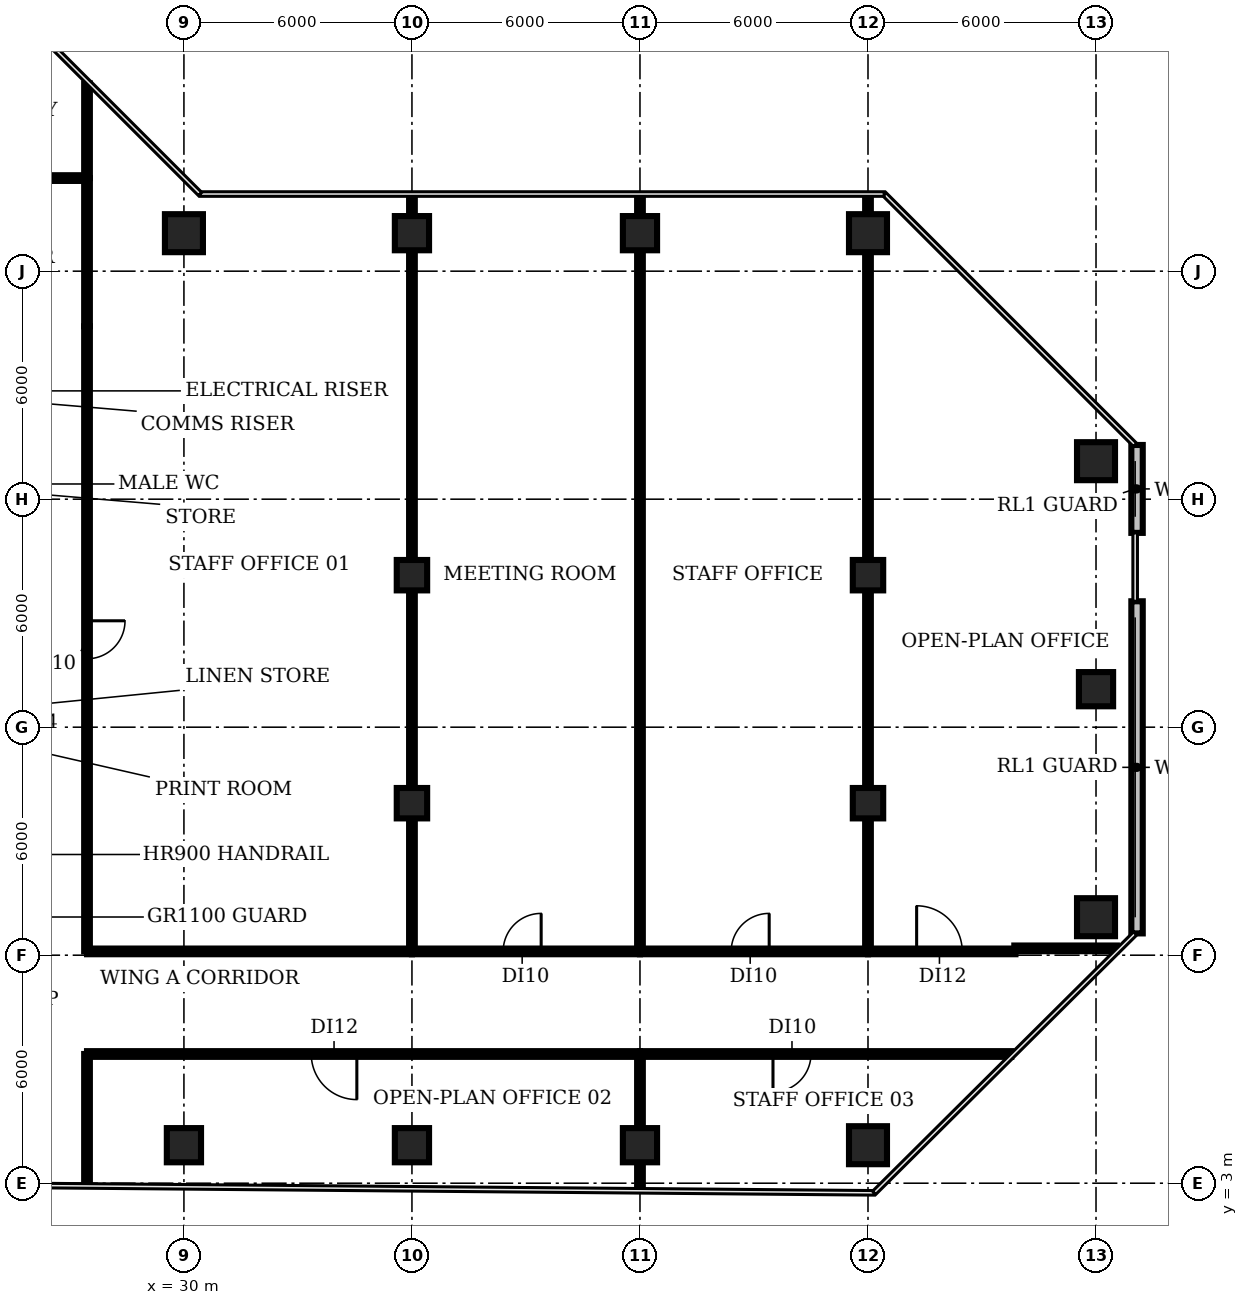
"""IFC4 building model, lengths in metres.
Left out: names, types, materials, properties, quantities, classifications, styles, units other than length and angle.
Written with IfcOpenShell. Run it as: python <this file> out.ifc"""

import sys

from ifc_helpers import new_model, si_unit, direction, frame, frame_2d, origin, origin_2d, place, context, subcontext, project, spatial, rectangle, circle, extrude, element, fill, save


model = new_model("IFC4")
c1 = context("Model", 3, precision=1e-05, world=origin(), true_north=direction((0.0, 1.0)))
c2 = subcontext(c1, "Body", "Model", "MODEL_VIEW")
j1 = project(units=[si_unit("LENGTHUNIT", "METRE"), si_unit("PLANEANGLEUNIT", "RADIAN")], contexts=[c1])
p1 = place(None, origin())
s1 = spatial("IfcSite", under=j1, at=p1, CompositionType="ELEMENT")
p2 = place(p1, origin())
s2 = spatial("IfcBuilding", under=s1, at=p2, CompositionType="ELEMENT")
p3 = place(p2, frame((0.0, 0.0, 113.0)))
s3 = spatial("IfcBuildingStorey", under=s2, at=p3, CompositionType="ELEMENT", Elevation=113.0)
p4 = place(p3, frame((30.0, 4.0, 0.0), z_axis=(0.0, 0.0, 1.0), x_axis=(1.0, 0.0, 0.0)))
e1 = element("IfcColumn", 1, at=p4, inside=s3, PredefinedType="COLUMN", context=c2, shape_type="SweptSolid", body=[
    extrude(rectangle(XDim=0.9, YDim=0.9, at=origin_2d()), origin(), (0.0, 0.0, 1.0), 3.85),
])
p5 = place(p3, frame((30.0, 28.0, 0.0), z_axis=(0.0, 0.0, 1.0), x_axis=(1.0, 0.0, 0.0)))
e2 = element("IfcColumn", 2, at=p5, inside=s3, PredefinedType="COLUMN", context=c2, shape_type="SweptSolid", body=[
    extrude(circle(Radius=0.5, at=origin_2d()), origin(), (0.0, 0.0, 1.0), 3.85),
])
p6 = place(p3, frame((36.0, 4.0, 0.0), z_axis=(0.0, 0.0, 1.0), x_axis=(1.0, 0.0, 0.0)))
e3 = element("IfcColumn", 3, at=p6, inside=s3, PredefinedType="COLUMN", context=c2, shape_type="SweptSolid", body=[
    extrude(rectangle(XDim=0.9, YDim=0.9, at=origin_2d()), origin(), (0.0, 0.0, 1.0), 3.85),
])
for number, where, z_axis, x_axis in (
    (4, (36.0, 13.0, 0.0), (0.0, 0.0, 1.0), (1.0, 0.0, 0.0)),
    (5, (36.0, 19.0, 0.0), (0.0, 0.0, 1.0), (1.0, 0.0, 0.0)),
):
    element("IfcColumn", number, at=place(p3, frame(where, z_axis=z_axis, x_axis=x_axis)), inside=s3, PredefinedType="COLUMN", context=c2, shape_type="SweptSolid", body=[
        extrude(rectangle(XDim=0.8, YDim=0.8, at=origin_2d()), origin(), (0.0, 0.0, 1.0), 3.85),
    ])
for number, where, z_axis, x_axis in (
    (6, (36.0, 28.0, 0.0), (0.0, 0.0, 1.0), (1.0, 0.0, 0.0)),
    (7, (42.0, 4.0, 0.0), (0.0, 0.0, 1.0), (1.0, 0.0, 0.0)),
    (8, (42.0, 28.0, 0.0), (0.0, 0.0, 1.0), (1.0, 0.0, 0.0)),
):
    element("IfcColumn", number, at=place(p3, frame(where, z_axis=z_axis, x_axis=x_axis)), inside=s3, PredefinedType="COLUMN", context=c2, shape_type="SweptSolid", body=[
        extrude(rectangle(XDim=0.9, YDim=0.9, at=origin_2d()), origin(), (0.0, 0.0, 1.0), 3.85),
    ])
p7 = place(p3, frame((48.0, 4.0, 0.0), z_axis=(0.0, 0.0, 1.0), x_axis=(1.0, 0.0, 0.0)))
e9 = element("IfcColumn", 9, at=p7, inside=s3, PredefinedType="COLUMN", context=c2, shape_type="SweptSolid", body=[
    extrude(circle(Radius=0.5, at=origin_2d()), origin(), (0.0, 0.0, 1.0), 3.85),
])
for number, where, z_axis, x_axis in (
    (10, (48.0, 13.0, 0.0), (0.0, 0.0, 1.0), (1.0, 0.0, 0.0)),
    (11, (48.0, 19.0, 0.0), (0.0, 0.0, 1.0), (1.0, 0.0, 0.0)),
):
    element("IfcColumn", number, at=place(p3, frame(where, z_axis=z_axis, x_axis=x_axis)), inside=s3, PredefinedType="COLUMN", context=c2, shape_type="SweptSolid", body=[
        extrude(rectangle(XDim=0.8, YDim=0.8, at=origin_2d()), origin(), (0.0, 0.0, 1.0), 3.85),
    ])
for number, where, z_axis, x_axis in (
    (12, (48.0, 28.0, 0.0), (0.0, 0.0, 1.0), (1.0, 0.0, 0.0)),
    (13, (54.0, 10.0, 0.0), (0.0, 0.0, 1.0), (1.0, 0.0, 0.0)),
):
    element("IfcColumn", number, at=place(p3, frame(where, z_axis=z_axis, x_axis=x_axis)), inside=s3, PredefinedType="COLUMN", context=c2, shape_type="SweptSolid", body=[
        extrude(circle(Radius=0.5, at=origin_2d()), origin(), (0.0, 0.0, 1.0), 3.85),
    ])
p8 = place(p3, frame((54.0, 16.0, 0.0), z_axis=(0.0, 0.0, 1.0), x_axis=(1.0, 0.0, 0.0)))
e14 = element("IfcColumn", 14, at=p8, inside=s3, PredefinedType="COLUMN", context=c2, shape_type="SweptSolid", body=[
    extrude(rectangle(XDim=0.9, YDim=0.9, at=origin_2d()), origin(), (0.0, 0.0, 1.0), 3.85),
])
p9 = place(p3, frame((54.0, 22.0, 0.0), z_axis=(0.0, 0.0, 1.0), x_axis=(1.0, 0.0, 0.0)))
e15 = element("IfcColumn", 15, at=p9, inside=s3, PredefinedType="COLUMN", context=c2, shape_type="SweptSolid", body=[
    extrude(circle(Radius=0.5, at=origin_2d()), origin(), (0.0, 0.0, 1.0), 3.85),
])
p10 = place(p3, frame((55.08, 9.573, 0.0), z_axis=(0.0, 0.0, 1.0), x_axis=(0.0, 1.0, 0.0)))
e16 = element("IfcWall", 16, at=p10, inside=s3, PredefinedType="SOLIDWALL", context=c2, shape_type="SweptSolid", body=[
    extrude(rectangle(XDim=8.74, YDim=0.3, at=frame_2d((4.37, 0.0))), origin(), (0.0, 0.0, 1.0), 3.85),
])
p11 = place(p3, frame((55.08, 20.113, 0.0), z_axis=(0.0, 0.0, 1.0), x_axis=(0.0, 1.0, 0.0)))
e17 = element("IfcWall", 17, at=p11, inside=s3, PredefinedType="SOLIDWALL", context=c2, shape_type="SweptSolid", body=[
    extrude(rectangle(XDim=2.313, YDim=0.3, at=frame_2d((1.157, 0.0))), origin(), (0.0, 0.0, 1.0), 3.85),
])
p12 = place(p3, frame((23.85, 29.45, 0.0), z_axis=(0.0, 0.0, 1.0), x_axis=(1.0, 0.0, 0.0)))
e18 = element("IfcWall", 18, at=p12, inside=s3, PredefinedType="PARTITIONING", context=c2, shape_type="SweptSolid", body=[
    extrude(rectangle(XDim=3.6, YDim=0.15, at=frame_2d((1.8, 0.0))), origin(), (0.0, 0.0, 1.0), 2.83),
])
p13 = place(p12, frame((1.3, 0.0, 0.0)))
e19 = element("IfcOpeningElement", 19, at=p13, cuts=e18, PredefinedType="OPENING", context=c2, shape_type="SweptSolid", body=[
    extrude(rectangle(XDim=0.9, YDim=2.1, at=frame_2d((0.45, 1.05))), frame((0.0, 0.085, 0.0), z_axis=(0.0, -1.0, 0.0), x_axis=(1.0, 0.0, 0.0)), (0.0, 0.0, 1.0), 0.17),
])
p14 = place(p3, frame((27.45, 2.98, 0.0), z_axis=(0.0, 0.0, 1.0), x_axis=(0.0, 1.0, 0.0)))
e20 = element("IfcWall", 20, at=p14, inside=s3, PredefinedType="PARTITIONING", context=c2, shape_type="SweptSolid", body=[
    extrude(rectangle(XDim=3.42, YDim=0.15, at=frame_2d((1.71, 0.0))), origin(), (0.0, 0.0, 1.0), 2.83),
])
p15 = place(p3, frame((27.45, 9.1, 0.0), z_axis=(0.0, 0.0, 1.0), x_axis=(1.0, 0.0, 0.0)))
e21 = element("IfcWall", 21, at=p15, inside=s3, PredefinedType="PARTITIONING", context=c2, shape_type="SweptSolid", body=[
    extrude(rectangle(XDim=8.55, YDim=0.15, at=frame_2d((4.275, 0.0))), origin(), (0.0, 0.0, 1.0), 2.83),
])
p16 = place(p3, frame((27.45, 25.55, 0.0), z_axis=(0.0, 0.0, 1.0), x_axis=(0.0, -1.0, 0.0)))
e22 = element("IfcWall", 22, at=p16, inside=s3, PredefinedType="PARTITIONING", context=c2, shape_type="SweptSolid", body=[
    extrude(rectangle(XDim=16.45, YDim=0.15, at=frame_2d((8.225, 0.0))), origin(), (0.0, 0.0, 1.0), 2.83),
])
p17 = place(p16, frame((7.75, 0.0, 0.0)))
e23 = element("IfcOpeningElement", 23, at=p17, cuts=e22, PredefinedType="OPENING", context=c2, shape_type="SweptSolid", body=[
    extrude(rectangle(XDim=1.0, YDim=2.1, at=frame_2d((0.5, 1.05))), frame((0.0, 0.085, 0.0), z_axis=(0.0, -1.0, 0.0), x_axis=(1.0, 0.0, 0.0)), (0.0, 0.0, 1.0), 0.17),
])
p18 = place(p3, frame((27.45, 25.55, 0.0), z_axis=(0.0, 0.0, 1.0), x_axis=(0.0, 1.0, 0.0)))
e24 = element("IfcWall", 24, at=p18, inside=s3, PredefinedType="PARTITIONING", context=c2, shape_type="SweptSolid", body=[
    extrude(rectangle(XDim=3.9, YDim=0.15, at=frame_2d((1.95, 0.0))), origin(), (0.0, 0.0, 1.0), 2.83),
])
p19 = place(p3, frame((27.45, 29.45, 0.0), z_axis=(0.0, 0.0, 1.0), x_axis=(0.0, 1.0, 0.0)))
e25 = element("IfcWall", 25, at=p19, inside=s3, PredefinedType="PARTITIONING", context=c2, shape_type="SweptSolid", body=[
    extrude(rectangle(XDim=2.49, YDim=0.15, at=frame_2d((1.245, 0.0))), origin(), (0.0, 0.0, 1.0), 2.83),
])
p20 = place(p3, frame((36.0, 9.1, 0.0), z_axis=(0.0, 0.0, 1.0), x_axis=(0.0, 1.0, 0.0)))
e26 = element("IfcWall", 26, at=p20, inside=s3, PredefinedType="PARTITIONING", context=c2, shape_type="SweptSolid", body=[
    extrude(rectangle(XDim=19.88, YDim=0.15, at=frame_2d((9.94, 0.0))), origin(), (0.0, 0.0, 1.0), 2.83),
])
p21 = place(p3, frame((36.0, 9.1, 0.0), z_axis=(0.0, 0.0, 1.0), x_axis=(1.0, 0.0, 0.0)))
e27 = element("IfcWall", 27, at=p21, inside=s3, PredefinedType="PARTITIONING", context=c2, shape_type="SweptSolid", body=[
    extrude(rectangle(XDim=6.0, YDim=0.15, at=frame_2d((3.0, 0.0))), origin(), (0.0, 0.0, 1.0), 2.83),
])
p22 = place(p21, frame((2.4, 0.0, 0.0)))
e28 = element("IfcOpeningElement", 28, at=p22, cuts=e27, PredefinedType="OPENING", context=c2, shape_type="SweptSolid", body=[
    extrude(rectangle(XDim=1.0, YDim=2.1, at=frame_2d((0.5, 1.05))), frame((0.0, 0.085, 0.0), z_axis=(0.0, -1.0, 0.0), x_axis=(1.0, 0.0, 0.0)), (0.0, 0.0, 1.0), 0.17),
])
p23 = place(p3, frame((42.0, 2.85, 0.0), z_axis=(0.0, 0.0, 1.0), x_axis=(0.0, 1.0, 0.0)))
e29 = element("IfcWall", 29, at=p23, inside=s3, PredefinedType="PARTITIONING", context=c2, shape_type="SweptSolid", body=[
    extrude(rectangle(XDim=3.55, YDim=0.15, at=frame_2d((1.775, 0.0))), origin(), (0.0, 0.0, 1.0), 2.83),
])
p24 = place(p3, frame((42.0, 6.4, 0.0), z_axis=(0.0, 0.0, 1.0), x_axis=(-1.0, 0.0, 0.0)))
e30 = element("IfcWall", 30, at=p24, inside=s3, PredefinedType="PARTITIONING", context=c2, shape_type="SweptSolid", body=[
    extrude(rectangle(XDim=14.55, YDim=0.15, at=frame_2d((7.275, 0.0))), origin(), (0.0, 0.0, 1.0), 2.83),
])
p25 = place(p24, frame((7.45, 0.0, 0.0)))
e31 = element("IfcOpeningElement", 31, at=p25, cuts=e30, PredefinedType="OPENING", context=c2, shape_type="SweptSolid", body=[
    extrude(rectangle(XDim=1.2, YDim=2.1, at=frame_2d((0.6, 1.05))), frame((0.0, 0.085, 0.0), z_axis=(0.0, -1.0, 0.0), x_axis=(1.0, 0.0, 0.0)), (0.0, 0.0, 1.0), 0.17),
])
p26 = place(p3, frame((42.0, 9.1, 0.0), z_axis=(0.0, 0.0, 1.0), x_axis=(0.0, 1.0, 0.0)))
e32 = element("IfcWall", 32, at=p26, inside=s3, PredefinedType="PARTITIONING", context=c2, shape_type="SweptSolid", body=[
    extrude(rectangle(XDim=19.88, YDim=0.15, at=frame_2d((9.94, 0.0))), origin(), (0.0, 0.0, 1.0), 2.83),
])
p27 = place(p3, frame((42.0, 9.1, 0.0), z_axis=(0.0, 0.0, 1.0), x_axis=(1.0, 0.0, 0.0)))
e33 = element("IfcWall", 33, at=p27, inside=s3, PredefinedType="PARTITIONING", context=c2, shape_type="SweptSolid", body=[
    extrude(rectangle(XDim=6.0, YDim=0.15, at=frame_2d((3.0, 0.0))), origin(), (0.0, 0.0, 1.0), 2.83),
])
p28 = place(p27, frame((2.4, 0.0, 0.0)))
e34 = element("IfcOpeningElement", 34, at=p28, cuts=e33, PredefinedType="OPENING", context=c2, shape_type="SweptSolid", body=[
    extrude(rectangle(XDim=1.0, YDim=2.1, at=frame_2d((0.5, 1.05))), frame((0.0, 0.085, 0.0), z_axis=(0.0, -1.0, 0.0), x_axis=(1.0, 0.0, 0.0)), (0.0, 0.0, 1.0), 0.17),
])
p29 = place(p3, frame((48.0, 9.1, 0.0), z_axis=(0.0, 0.0, 1.0), x_axis=(0.0, 1.0, 0.0)))
e35 = element("IfcWall", 35, at=p29, inside=s3, PredefinedType="PARTITIONING", context=c2, shape_type="SweptSolid", body=[
    extrude(rectangle(XDim=19.88, YDim=0.15, at=frame_2d((9.94, 0.0))), origin(), (0.0, 0.0, 1.0), 2.83),
])
p30 = place(p3, frame((48.0, 9.1, 0.0), z_axis=(0.0, 0.0, 1.0), x_axis=(1.0, 0.0, 0.0)))
e36 = element("IfcWall", 36, at=p30, inside=s3, PredefinedType="PARTITIONING", context=c2, shape_type="SweptSolid", body=[
    extrude(rectangle(XDim=3.88, YDim=0.15, at=frame_2d((1.94, 0.0))), origin(), (0.0, 0.0, 1.0), 2.83),
])
p31 = place(p30, frame((1.28, 0.0, 0.0)))
e37 = element("IfcOpeningElement", 37, at=p31, cuts=e36, PredefinedType="OPENING", context=c2, shape_type="SweptSolid", body=[
    extrude(rectangle(XDim=1.2, YDim=2.1, at=frame_2d((0.6, 1.05))), frame((0.0, 0.085, 0.0), z_axis=(0.0, -1.0, 0.0), x_axis=(1.0, 0.0, 0.0)), (0.0, 0.0, 1.0), 0.17),
])
p32 = place(p3, frame((51.77, 6.4, 0.0), z_axis=(0.0, 0.0, 1.0), x_axis=(-1.0, 0.0, 0.0)))
e38 = element("IfcWall", 38, at=p32, inside=s3, PredefinedType="PARTITIONING", context=c2, shape_type="SweptSolid", body=[
    extrude(rectangle(XDim=9.77, YDim=0.15, at=frame_2d((4.885, 0.0))), origin(), (0.0, 0.0, 1.0), 2.83),
])
p33 = place(p32, frame((5.27, 0.0, 0.0)))
e39 = element("IfcOpeningElement", 39, at=p33, cuts=e38, PredefinedType="OPENING", context=c2, shape_type="SweptSolid", body=[
    extrude(rectangle(XDim=1.0, YDim=2.1, at=frame_2d((0.5, 1.05))), frame((0.0, 0.085, 0.0), z_axis=(0.0, -1.0, 0.0), x_axis=(1.0, 0.0, 0.0)), (0.0, 0.0, 1.0), 0.17),
])
p34 = place(p3, frame((51.85, 9.18, 0.0), z_axis=(0.0, 0.0, 1.0), x_axis=(1.0, 0.0, 0.0)))
e40 = element("IfcWall", 40, at=p34, inside=s3, PredefinedType="PARTITIONING", context=c2, shape_type="SweptSolid", body=[
    extrude(rectangle(XDim=2.699, YDim=0.15, at=frame_2d((1.35, 0.0))), origin(), (0.0, 0.0, 1.0), 2.83),
])
p35 = place(p17, origin())
e41 = element("IfcDoor", 41, at=p35, inside=s3, OperationType="SINGLE_SWING_LEFT", PredefinedType="DOOR", context=c2, shape_type="SweptSolid", body=[
    extrude(rectangle(XDim=1.0, YDim=2.1, at=frame_2d((0.5, 1.05))), frame((0.0, 0.025, 0.0), z_axis=(0.0, -1.0, 0.0), x_axis=(1.0, 0.0, 0.0)), (0.0, 0.0, 1.0), 0.05),
])
fill(e23, e41)
p36 = place(p22, origin())
e42 = element("IfcDoor", 42, at=p36, inside=s3, OperationType="SINGLE_SWING_RIGHT", PredefinedType="DOOR", context=c2, shape_type="SweptSolid", body=[
    extrude(rectangle(XDim=1.0, YDim=2.1, at=frame_2d((0.5, 1.05))), frame((0.0, 0.025, 0.0), z_axis=(0.0, -1.0, 0.0), x_axis=(1.0, 0.0, 0.0)), (0.0, 0.0, 1.0), 0.05),
])
fill(e28, e42)
p37 = place(p25, origin())
e43 = element("IfcDoor", 43, at=p37, inside=s3, OperationType="SINGLE_SWING_LEFT", PredefinedType="DOOR", context=c2, shape_type="SweptSolid", body=[
    extrude(rectangle(XDim=1.2, YDim=2.1, at=frame_2d((0.6, 1.05))), frame((0.0, 0.025, 0.0), z_axis=(0.0, -1.0, 0.0), x_axis=(1.0, 0.0, 0.0)), (0.0, 0.0, 1.0), 0.05),
])
fill(e31, e43)
p38 = place(p28, origin())
e44 = element("IfcDoor", 44, at=p38, inside=s3, OperationType="SINGLE_SWING_RIGHT", PredefinedType="DOOR", context=c2, shape_type="SweptSolid", body=[
    extrude(rectangle(XDim=1.0, YDim=2.1, at=frame_2d((0.5, 1.05))), frame((0.0, 0.025, 0.0), z_axis=(0.0, -1.0, 0.0), x_axis=(1.0, 0.0, 0.0)), (0.0, 0.0, 1.0), 0.05),
])
fill(e34, e44)
p39 = place(p31, origin())
e45 = element("IfcDoor", 45, at=p39, inside=s3, OperationType="SINGLE_SWING_LEFT", PredefinedType="DOOR", context=c2, shape_type="SweptSolid", body=[
    extrude(rectangle(XDim=1.2, YDim=2.1, at=frame_2d((0.6, 1.05))), frame((0.0, 0.025, 0.0), z_axis=(0.0, -1.0, 0.0), x_axis=(1.0, 0.0, 0.0)), (0.0, 0.0, 1.0), 0.05),
])
fill(e37, e45)
p40 = place(p33, origin())
e46 = element("IfcDoor", 46, at=p40, inside=s3, OperationType="SINGLE_SWING_RIGHT", PredefinedType="DOOR", context=c2, shape_type="SweptSolid", body=[
    extrude(rectangle(XDim=1.0, YDim=2.1, at=frame_2d((0.5, 1.05))), frame((0.0, 0.025, 0.0), z_axis=(0.0, -1.0, 0.0), x_axis=(1.0, 0.0, 0.0)), (0.0, 0.0, 1.0), 0.05),
])
fill(e39, e46)
save(model, sys.argv[1])
